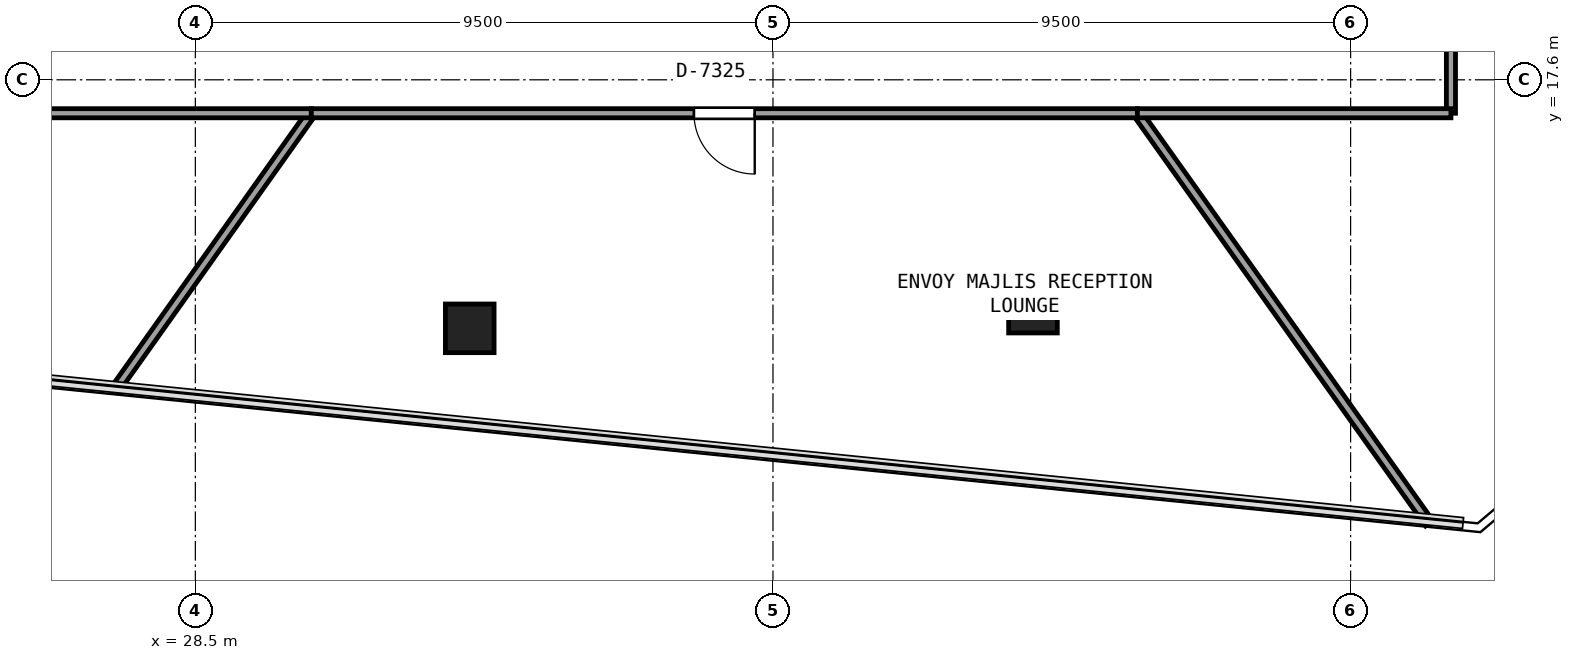
"""IFC4 building model, lengths in metres.
Left out: names, types, materials, properties, quantities, classifications, styles, units other than length and angle.
Written with IfcOpenShell. Run it as: python <this file> out.ifc"""

import sys

from ifc_helpers import new_model, si_unit, direction, frame, frame_2d, origin, origin_2d, place, context, subcontext, project, spatial, rectangle, extrude, element, fill, save


model = new_model("IFC4")
c1 = context("Model", 3, precision=1e-05, world=origin(), true_north=direction((0.0, 1.0)))
c2 = subcontext(c1, "Body", "Model", "MODEL_VIEW")
j1 = project(units=[si_unit("LENGTHUNIT", "METRE"), si_unit("PLANEANGLEUNIT", "RADIAN")], contexts=[c1])
p1 = place(None, origin())
s1 = spatial("IfcSite", under=j1, at=p1, CompositionType="ELEMENT")
p2 = place(p1, origin())
s2 = spatial("IfcBuilding", under=s1, at=p2, CompositionType="ELEMENT")
p3 = place(p2, frame((0.0, 0.0, 271.5)))
s3 = spatial("IfcBuildingStorey", under=s2, at=p3, CompositionType="ELEMENT", Elevation=271.5)
for number, where, z_axis, x_axis in (
    (1, (33.013, 13.513, 0.0), (0.0, 0.0, 1.0), (1.0, 0.0, 0.0)),
    (2, (42.276, 13.837, 0.0), (0.0, 0.0, 1.0), (1.0, 0.0, 0.0)),
):
    element("IfcColumn", number, at=place(p3, frame(where, z_axis=z_axis, x_axis=x_axis)), inside=s3, PredefinedType="COLUMN", context=c2, shape_type="SweptSolid", body=[
        extrude(rectangle(XDim=0.8, YDim=0.8, at=origin_2d()), origin(), (0.0, 0.0, 1.0), 3.32),
    ])
p4 = place(p3, frame((27.173, 12.497, 0.0), z_axis=(0.0, 0.0, 1.0), x_axis=(0.579073338368, 0.815275455777, 0.0)))
e3 = element("IfcWall", 3, at=p4, inside=s3, PredefinedType="PARTITIONING", context=c2, shape_type="SweptSolid", body=[
    extrude(rectangle(XDim=5.584, YDim=0.15, at=frame_2d((2.792, 0.0))), origin(), (0.0, 0.0, 1.0), 2.845),
])
p5 = place(p3, frame((30.407, 17.05, 0.0), z_axis=(0.0, 0.0, 1.0), x_axis=(-1.0, 0.0, 0.0)))
e4 = element("IfcWall", 4, at=p5, inside=s3, PredefinedType="PARTITIONING", context=c2, shape_type="SweptSolid", body=[
    extrude(rectangle(XDim=5.157, YDim=0.15, at=frame_2d((2.579, 0.0))), origin(), (0.0, 0.0, 1.0), 2.845),
])
p6 = place(p3, frame((48.794, 10.306, 0.0), z_axis=(0.0, 0.0, 1.0), x_axis=(-0.579940250293, 0.814659012158, 0.0)))
e5 = element("IfcWall", 5, at=p6, inside=s3, PredefinedType="PARTITIONING", context=c2, shape_type="SweptSolid", body=[
    extrude(rectangle(XDim=8.279, YDim=0.15, at=frame_2d((4.139, 0.0))), origin(), (0.0, 0.0, 1.0), 2.845),
])
p7 = place(p3, frame((43.993, 17.05, 0.0), z_axis=(0.0, 0.0, 1.0), x_axis=(-1.0, 0.0, 0.0)))
e6 = element("IfcWall", 6, at=p7, inside=s3, PredefinedType="PARTITIONING", context=c2, shape_type="SweptSolid", body=[
    extrude(rectangle(XDim=13.586, YDim=0.15, at=frame_2d((6.793, 0.0))), origin(), (0.0, 0.0, 1.0), 2.769),
])
p8 = place(p7, frame((6.293, 0.0, 0.0)))
e7 = element("IfcOpeningElement", 7, at=p8, cuts=e6, PredefinedType="OPENING", context=c2, shape_type="SweptSolid", body=[
    extrude(rectangle(XDim=1.0, YDim=2.15, at=frame_2d((0.5, 1.075))), frame((0.0, 0.085, 0.0), z_axis=(0.0, -1.0, 0.0), x_axis=(1.0, 0.0, 0.0)), (0.0, 0.0, 1.0), 0.17),
])
p9 = place(p3, frame((49.15, 30.283, 0.0), z_axis=(0.0, 0.0, 1.0), x_axis=(0.0, -1.0, 0.0)))
e8 = element("IfcWall", 8, at=p9, inside=s3, PredefinedType="PARTITIONING", context=c2, shape_type="SweptSolid", body=[
    extrude(rectangle(XDim=13.233, YDim=0.15, at=frame_2d((6.616, 0.0))), origin(), (0.0, 0.0, 1.0), 2.769),
])
p10 = place(p9, frame((5.277, 0.0, 0.0)))
e9 = element("IfcOpeningElement", 9, at=p10, cuts=e8, PredefinedType="OPENING", context=c2, shape_type="SweptSolid", body=[
    extrude(rectangle(XDim=1.0, YDim=2.15, at=frame_2d((0.5, 1.075))), frame((0.0, 0.085, 0.0), z_axis=(0.0, -1.0, 0.0), x_axis=(1.0, 0.0, 0.0)), (0.0, 0.0, 1.0), 0.17),
])
p11 = place(p3, frame((49.15, 17.05, 0.0), z_axis=(0.0, 0.0, 1.0), x_axis=(-1.0, 0.0, 0.0)))
e10 = element("IfcWall", 10, at=p11, inside=s3, PredefinedType="PARTITIONING", context=c2, shape_type="SweptSolid", body=[
    extrude(rectangle(XDim=5.157, YDim=0.15, at=frame_2d((2.579, 0.0))), origin(), (0.0, 0.0, 1.0), 2.845),
])
p12 = place(p8, origin())
e11 = element("IfcDoor", 11, at=p12, inside=s3, OperationType="SINGLE_SWING_LEFT", PredefinedType="DOOR", context=c2, shape_type="SweptSolid", body=[
    extrude(rectangle(XDim=1.0, YDim=2.15, at=frame_2d((0.5, 1.075))), frame((0.0, 0.025, 0.0), z_axis=(0.0, -1.0, 0.0), x_axis=(1.0, 0.0, 0.0)), (0.0, 0.0, 1.0), 0.05),
])
fill(e7, e11)
save(model, sys.argv[1])
